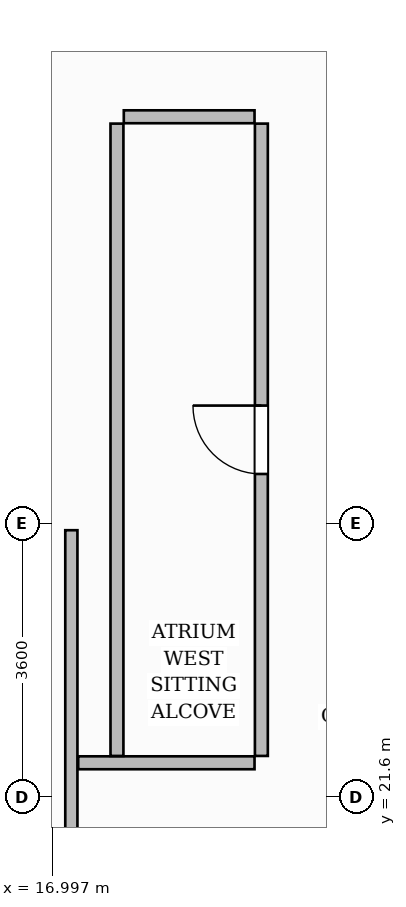
"""IFC4 building model, lengths in metres.
Left out: names, types, materials, properties, quantities, classifications, styles, units other than length and angle.
Written with IfcOpenShell. Run it as: python <this file> out.ifc"""

import sys

from ifc_helpers import new_model, si_unit, direction, frame, frame_2d, origin, place, context, subcontext, project, spatial, rectangle, extrude, source, transform, mapped, element, fill, save


model = new_model("IFC4")
c1 = context("Model", 3, precision=1e-05, world=origin(), true_north=direction((0.0, 1.0)))
c2 = subcontext(c1, "Body", "Model", "MODEL_VIEW")
j1 = project(units=[si_unit("LENGTHUNIT", "METRE"), si_unit("PLANEANGLEUNIT", "RADIAN")], contexts=[c1])
p1 = place(None, origin())
s1 = spatial("IfcSite", under=j1, at=p1, CompositionType="ELEMENT")
p2 = place(p1, origin())
s2 = spatial("IfcBuilding", under=s1, at=p2, CompositionType="ELEMENT")
p3 = place(p2, frame((0.0, 0.0, 76.8)))
s3 = spatial("IfcBuildingStorey", under=s2, at=p3, CompositionType="ELEMENT", Elevation=76.8)
p4 = place(p3, frame((17.25, 11.36, 0.0), z_axis=(0.0, 0.0, 1.0), x_axis=(0.0, 1.0, 0.0)))
e1 = element("IfcWall", 1, at=p4, inside=s3, PredefinedType="PARTITIONING", context=c2, shape_type="SweptSolid", body=[
    extrude(rectangle(XDim=13.75, YDim=0.16, at=frame_2d((6.875, 0.0))), origin(), (0.0, 0.0, 1.0), 3.45),
])
p5 = place(p3, frame((17.34, 22.05, 0.0), z_axis=(0.0, 0.0, 1.0), x_axis=(1.0, 0.0, 0.0)))
e2 = element("IfcWall", 2, at=p5, inside=s3, PredefinedType="PARTITIONING", context=c2, shape_type="SweptSolid", body=[
    extrude(rectangle(XDim=2.32, YDim=0.17, at=frame_2d((1.16, 0.0))), origin(), (0.0, 0.0, 1.0), 3.45),
])
p6 = place(p3, frame((17.94, 30.55, 0.0), z_axis=(0.0, 0.0, 1.0), x_axis=(1.0, 0.0, 0.0)))
e3 = element("IfcWall", 3, at=p6, inside=s3, PredefinedType="PARTITIONING", context=c2, shape_type="SweptSolid", body=[
    extrude(rectangle(XDim=1.72, YDim=0.17, at=frame_2d((0.86, 0.0))), origin(), (0.0, 0.0, 1.0), 3.45),
])
p7 = place(p3, frame((17.85, 22.14, 0.0), z_axis=(0.0, 0.0, 1.0), x_axis=(0.0, 1.0, 0.0)))
e4 = element("IfcWall", 4, at=p7, inside=s3, PredefinedType="PARTITIONING", context=c2, shape_type="SweptSolid", body=[
    extrude(rectangle(XDim=8.32, YDim=0.17, at=frame_2d((4.16, 0.0))), origin(), (0.0, 0.0, 1.0), 3.45),
])
p8 = place(p3, frame((19.75, 22.14, 0.0), z_axis=(0.0, 0.0, 1.0), x_axis=(0.0, 1.0, 0.0)))
e5 = element("IfcWall", 5, at=p8, inside=s3, PredefinedType="PARTITIONING", context=c2, shape_type="SweptSolid", body=[
    extrude(rectangle(XDim=8.32, YDim=0.17, at=frame_2d((4.16, 0.0))), origin(), (0.0, 0.0, 1.0), 3.45),
])
p9 = place(p8, frame((3.71, 0.0, 0.0)))
e6 = element("IfcOpeningElement", 6, at=p9, cuts=e5, PredefinedType="OPENING", context=c2, shape_type="SweptSolid", body=[
    extrude(rectangle(XDim=0.9, YDim=2.15, at=frame_2d((0.45, 1.075))), frame((0.0, 0.095, 0.0), z_axis=(0.0, -1.0, 0.0), x_axis=(1.0, 0.0, 0.0)), (0.0, 0.0, 1.0), 0.19),
])
m1 = source(origin(), c2, "Body", "SweptSolid", [
    extrude(rectangle(XDim=0.9, YDim=2.15, at=frame_2d((0.45, 1.075))), frame((0.0, 0.025, 0.0), z_axis=(0.0, -1.0, 0.0), x_axis=(1.0, 0.0, 0.0)), (0.0, 0.0, 1.0), 0.05),
])
p10 = place(p9, origin())
e7 = element("IfcDoor", 7, at=p10, inside=s3, OperationType="SINGLE_SWING_RIGHT", PredefinedType="DOOR", context=c2, shape_type="MappedRepresentation", body=[
    mapped(m1, transform((0.0, 0.0, 0.0), scale=1.0)),
])
fill(e6, e7)
save(model, sys.argv[1])
